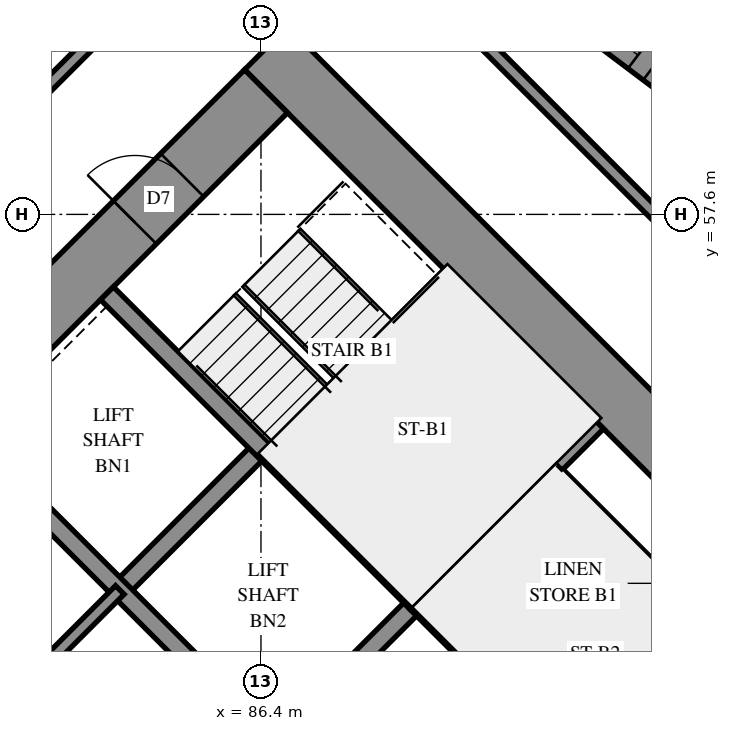
"""IFC4 building model, lengths in metres.
Left out: names, types, materials, properties, quantities, classifications, styles, units other than length and angle.
Written with IfcOpenShell. Run it as: python <this file> out.ifc"""

import sys

from ifc_helpers import new_model, si_unit, direction, frame, frame_2d, origin, place, context, subcontext, project, spatial, polyline, rectangle, outline, extrude, element, fill, save


model = new_model("IFC4")
c1 = context("Model", 3, precision=1e-05, world=origin(), true_north=direction((0.0, 1.0)))
c2 = subcontext(c1, "Body", "Model", "MODEL_VIEW")
j1 = project(units=[si_unit("LENGTHUNIT", "METRE"), si_unit("PLANEANGLEUNIT", "RADIAN")], contexts=[c1])
p1 = place(None, origin())
s1 = spatial("IfcSite", under=j1, at=p1, CompositionType="ELEMENT")
p2 = place(p1, origin())
s2 = spatial("IfcBuilding", under=s1, at=p2, CompositionType="ELEMENT")
p3 = place(p2, frame((0.0, 0.0, 47.4)))
s3 = spatial("IfcBuildingStorey", under=s2, at=p3, CompositionType="ELEMENT", Elevation=47.4)
p4 = place(p3, frame((86.483, 60.333, -0.3), z_axis=(0.0, 0.0, 1.0), x_axis=(0.70710983, -0.7071037324, 0.0)))
e1 = element("IfcWall", 1, at=p4, inside=s3, PredefinedType="SHEAR", context=c2, shape_type="SweptSolid", body=[
    extrude(rectangle(XDim=16.4, YDim=1.0, at=frame_2d((8.2, 0.0))), origin(), (0.0, 0.0, 1.0), 2.7),
])
p5 = place(p4, frame((11.0, 0.0, 0.3)))
e2 = element("IfcOpeningElement", 2, at=p5, cuts=e1, PredefinedType="OPENING", context=c2, shape_type="SweptSolid", body=[
    extrude(rectangle(XDim=0.8, YDim=2.1, at=frame_2d((0.4, 1.05))), frame((0.0, 0.51, 0.0), z_axis=(0.0, -1.0, 0.0), x_axis=(1.0, 0.0, 0.0)), (0.0, 0.0, 1.0), 1.02),
])
p6 = place(p3, frame((76.301, 49.443, -0.3), z_axis=(0.0, 0.0, 1.0), x_axis=(0.7071067812, 0.7071067812, 0.0)))
e3 = element("IfcWall", 3, at=p6, inside=s3, PredefinedType="SHEAR", context=c2, shape_type="SweptSolid", body=[
    extrude(rectangle(XDim=14.4, YDim=1.0, at=frame_2d((7.2, 0.0))), origin(), (0.0, 0.0, 1.0), 2.7),
])
p7 = place(p6, frame((4.55, 0.0, 0.3)))
e4 = element("IfcOpeningElement", 4, at=p7, cuts=e3, PredefinedType="OPENING", context=c2, shape_type="SweptSolid", body=[
    extrude(rectangle(XDim=1.1, YDim=2.1, at=frame_2d((0.55, 1.05))), frame((0.0, 0.51, 0.0), z_axis=(0.0, -1.0, 0.0), x_axis=(1.0, 0.0, 0.0)), (0.0, 0.0, 1.0), 1.02),
])
p8 = place(p6, frame((11.35, 0.0, 0.3)))
e5 = element("IfcOpeningElement", 5, at=p8, cuts=e3, PredefinedType="OPENING", context=c2, shape_type="SweptSolid", body=[
    extrude(rectangle(XDim=1.1, YDim=2.1, at=frame_2d((0.55, 1.05))), frame((0.0, 0.51, 0.0), z_axis=(0.0, -1.0, 0.0), x_axis=(1.0, 0.0, 0.0)), (0.0, 0.0, 1.0), 1.02),
])
p9 = place(p3, frame((84.079, 51.423, 0.0), z_axis=(0.0, 0.0, 1.0), x_axis=(0.7071219326, 0.7070916295, 0.0)))
e6 = element("IfcWall", 6, at=p9, inside=s3, PredefinedType="SOLIDWALL", context=c2, shape_type="SweptSolid", body=[
    extrude(rectangle(XDim=3.3, YDim=0.3, at=frame_2d((1.65, 0.0))), origin(), (0.0, 0.0, 1.0), 3.1),
])
p10 = place(p3, frame((86.625, 48.878, 0.0), z_axis=(0.0, 0.0, 1.0), x_axis=(0.7071067812, 0.7071067812, 0.0)))
e7 = element("IfcWall", 7, at=p10, inside=s3, PredefinedType="SOLIDWALL", context=c2, shape_type="SweptSolid", body=[
    extrude(rectangle(XDim=3.3, YDim=0.3, at=frame_2d((1.65, 0.0))), origin(), (0.0, 0.0, 1.0), 3.1),
])
p11 = place(p3, frame((78.988, 51.423, 0.0), z_axis=(0.0, 0.0, 1.0), x_axis=(0.7071067812, -0.7071067812, 0.0)))
e8 = element("IfcWall", 8, at=p11, inside=s3, PredefinedType="SOLIDWALL", context=c2, shape_type="SweptSolid", body=[
    extrude(rectangle(XDim=14.4, YDim=0.3, at=frame_2d((7.2, 0.0))), origin(), (0.0, 0.0, 1.0), 3.1),
])
p12 = place(p11, frame((1.25, 0.0, 0.0)))
e9 = element("IfcOpeningElement", 9, at=p12, cuts=e8, PredefinedType="OPENING", context=c2, shape_type="SweptSolid", body=[
    extrude(rectangle(XDim=1.1, YDim=2.1, at=frame_2d((0.55, 1.05))), frame((0.0, 0.16, 0.0), z_axis=(0.0, -1.0, 0.0), x_axis=(1.0, 0.0, 0.0)), (0.0, 0.0, 1.0), 0.32),
])
p13 = place(p11, frame((4.85, 0.0, 0.0)))
e10 = element("IfcOpeningElement", 10, at=p13, cuts=e8, PredefinedType="OPENING", context=c2, shape_type="SweptSolid", body=[
    extrude(rectangle(XDim=1.1, YDim=2.1, at=frame_2d((0.55, 1.05))), frame((0.0, 0.16, 0.0), z_axis=(0.0, -1.0, 0.0), x_axis=(1.0, 0.0, 0.0)), (0.0, 0.0, 1.0), 0.32),
])
p14 = place(p11, frame((8.45, 0.0, 0.0)))
e11 = element("IfcOpeningElement", 11, at=p14, cuts=e8, PredefinedType="OPENING", context=c2, shape_type="SweptSolid", body=[
    extrude(rectangle(XDim=1.1, YDim=2.1, at=frame_2d((0.55, 1.05))), frame((0.0, 0.16, 0.0), z_axis=(0.0, -1.0, 0.0), x_axis=(1.0, 0.0, 0.0)), (0.0, 0.0, 1.0), 0.32),
])
p15 = place(p11, frame((12.05, 0.0, 0.0)))
e12 = element("IfcOpeningElement", 12, at=p15, cuts=e8, PredefinedType="OPENING", context=c2, shape_type="SweptSolid", body=[
    extrude(rectangle(XDim=1.1, YDim=2.1, at=frame_2d((0.55, 1.05))), frame((0.0, 0.16, 0.0), z_axis=(0.0, -1.0, 0.0), x_axis=(1.0, 0.0, 0.0)), (0.0, 0.0, 1.0), 0.32),
])
p16 = place(p3, frame((81.534, 53.969, 0.0), z_axis=(0.0, 0.0, 1.0), x_axis=(0.707103309, -0.7071102534, 0.0)))
e13 = element("IfcWall", 13, at=p16, inside=s3, PredefinedType="SOLIDWALL", context=c2, shape_type="SweptSolid", body=[
    extrude(rectangle(XDim=14.4, YDim=0.3, at=frame_2d((7.2, 0.0))), origin(), (0.0, 0.0, 1.0), 3.1),
])
p17 = place(p16, frame((12.05, 0.0, 0.0)))
e14 = element("IfcOpeningElement", 14, at=p17, cuts=e13, PredefinedType="OPENING", context=c2, shape_type="SweptSolid", body=[
    extrude(rectangle(XDim=1.1, YDim=2.1, at=frame_2d((0.55, 1.05))), frame((0.0, 0.16, 0.0), z_axis=(0.0, -1.0, 0.0), x_axis=(1.0, 0.0, 0.0)), (0.0, 0.0, 1.0), 0.32),
])
for number, where, z_axis, x_axis in (
    (15, (83.867, 56.302, 0.0), (0.0, 0.0, 1.0), (0.707, -0.707, 0.0)),
    (16, (88.958, 51.211, 0.0), (0.0, 0.0, 1.0), (0.707, -0.707, 0.0)),
):
    element("IfcWall", number, at=place(p3, frame(where, z_axis=z_axis, x_axis=x_axis)), inside=s3, PredefinedType="SOLIDWALL", context=c2, shape_type="SweptSolid", body=[
        extrude(rectangle(XDim=7.2, YDim=0.3, at=frame_2d((3.6, 0.0))), origin(), (0.0, 0.0, 1.0), 3.1),
    ])
p18 = place(p3, frame((88.958, 51.211, 0.0), z_axis=(0.0, 0.0, 1.0), x_axis=(0.7071067812, 0.7071067812, 0.0)))
e17 = element("IfcWall", 17, at=p18, inside=s3, PredefinedType="SOLIDWALL", context=c2, shape_type="SweptSolid", body=[
    extrude(rectangle(XDim=4.2, YDim=0.3, at=frame_2d((2.1, 0.0))), origin(), (0.0, 0.0, 1.0), 3.1),
])
p19 = place(p3, frame((94.094, 59.092, 0.0), z_axis=(0.0, 0.0, 1.0), x_axis=(-0.7985199762, 0.6019683111, 0.0)))
e18 = element("IfcWall", 18, at=p19, inside=s3, PredefinedType="SOLIDWALL", context=c2, shape_type="SweptSolid", body=[
    extrude(outline(polyline([(-0.039, -0.275), (3.429, -0.275), (3.506, 0.275), (0.039, 0.275), (-0.039, -0.275)])), origin(), (0.0, 0.0, 1.0), 3.1),
])
p20 = place(p19, frame((0.357, 0.0, 0.5)))
e19 = element("IfcOpeningElement", 19, at=p20, cuts=e18, PredefinedType="OPENING", context=c2, shape_type="SweptSolid", body=[
    extrude(rectangle(XDim=1.2, YDim=2.45, at=frame_2d((0.6, 1.225))), frame((0.0, 0.285, 0.0), z_axis=(0.0, -1.0, 0.0), x_axis=(1.0, 0.0, 0.0)), (0.0, 0.0, 1.0), 0.57),
])
p21 = place(p19, frame((1.872, 0.0, 0.5)))
e20 = element("IfcOpeningElement", 20, at=p21, cuts=e18, PredefinedType="OPENING", context=c2, shape_type="SweptSolid", body=[
    extrude(rectangle(XDim=1.2, YDim=2.45, at=frame_2d((0.6, 1.225))), frame((0.0, 0.285, 0.0), z_axis=(0.0, -1.0, 0.0), x_axis=(1.0, 0.0, 0.0)), (0.0, 0.0, 1.0), 0.57),
])
p22 = place(p3, frame((91.313, 53.354, 0.0), z_axis=(0.0, 0.0, 1.0), x_axis=(0.7071147811, -0.7070987812, 0.0)))
e21 = element("IfcWall", 21, at=p22, inside=s3, PredefinedType="PARTITIONING", context=c2, shape_type="SweptSolid", body=[
    extrude(rectangle(XDim=6.25, YDim=0.15, at=frame_2d((3.125, 0.0))), origin(), (0.0, 0.0, 1.0), 3.1),
])
p23 = place(p3, frame((81.534, 48.878, 0.0), z_axis=(0.0, 0.0, 1.0), x_axis=(0.707092892, 0.7071206701, 0.0)))
e22 = element("IfcWall", 22, at=p23, inside=s3, PredefinedType="PARTITIONING", context=c2, shape_type="SweptSolid", body=[
    extrude(rectangle(XDim=3.6, YDim=0.2, at=frame_2d((1.8, 0.0))), origin(), (0.0, 0.0, 1.0), 3.1),
])
p24 = place(p3, frame((81.052, 57.873, 0.0), z_axis=(0.0, 0.0, 1.0), x_axis=(0.7071067812, 0.7071067812, 0.0)))
e23 = element("IfcWall", 23, at=p24, inside=s3, PredefinedType="PARTITIONING", context=c2, shape_type="SweptSolid", body=[
    extrude(rectangle(XDim=8.18, YDim=0.2, at=frame_2d((4.09, 0.0))), origin(), (0.0, 0.0, 1.0), 3.1),
])
p25 = place(p24, frame((0.823, 0.0, 0.0)))
e24 = element("IfcOpeningElement", 24, at=p25, cuts=e23, PredefinedType="OPENING", context=c2, shape_type="SweptSolid", body=[
    extrude(rectangle(XDim=1.0, YDim=2.1, at=frame_2d((0.5, 1.05))), frame((0.0, 0.11, 0.0), z_axis=(0.0, -1.0, 0.0), x_axis=(1.0, 0.0, 0.0)), (0.0, 0.0, 1.0), 0.22),
])
p26 = place(p3, frame((89.271, 61.215, 0.0), z_axis=(0.0, 0.0, 1.0), x_axis=(0.7071067812, -0.7071067812, 0.0)))
e25 = element("IfcWall", 25, at=p26, inside=s3, PredefinedType="PARTITIONING", context=c2, shape_type="SweptSolid", body=[
    extrude(rectangle(XDim=6.505, YDim=0.2, at=frame_2d((3.253, 0.0))), origin(), (0.0, 0.0, 1.0), 3.1),
])
p27 = place(p20, origin())
e26 = element("IfcWindow", 26, at=p27, inside=s3, PartitioningType="SINGLE_PANEL", PredefinedType="WINDOW", context=c2, shape_type="SweptSolid", body=[
    extrude(rectangle(XDim=1.2, YDim=2.45, at=frame_2d((0.6, 1.225))), frame((0.0, 0.155, 0.0), z_axis=(0.0, -1.0, 0.0), x_axis=(1.0, 0.0, 0.0)), (0.0, 0.0, 1.0), 0.06),
])
fill(e19, e26)
p28 = place(p21, origin())
e27 = element("IfcWindow", 27, at=p28, inside=s3, PartitioningType="SINGLE_PANEL", PredefinedType="WINDOW", context=c2, shape_type="SweptSolid", body=[
    extrude(rectangle(XDim=1.2, YDim=2.45, at=frame_2d((0.6, 1.225))), frame((0.0, 0.155, 0.0), z_axis=(0.0, -1.0, 0.0), x_axis=(1.0, 0.0, 0.0)), (0.0, 0.0, 1.0), 0.06),
])
fill(e20, e27)
p29 = place(p8, origin())
e28 = element("IfcDoor", 28, at=p29, inside=s3, OperationType="SINGLE_SWING_LEFT", PredefinedType="DOOR", context=c2, shape_type="SweptSolid", body=[
    extrude(rectangle(XDim=1.1, YDim=2.1, at=frame_2d((0.55, 1.05))), frame((0.0, 0.025, 0.0), z_axis=(0.0, -1.0, 0.0), x_axis=(1.0, 0.0, 0.0)), (0.0, 0.0, 1.0), 0.05),
])
fill(e5, e28)
save(model, sys.argv[1])
